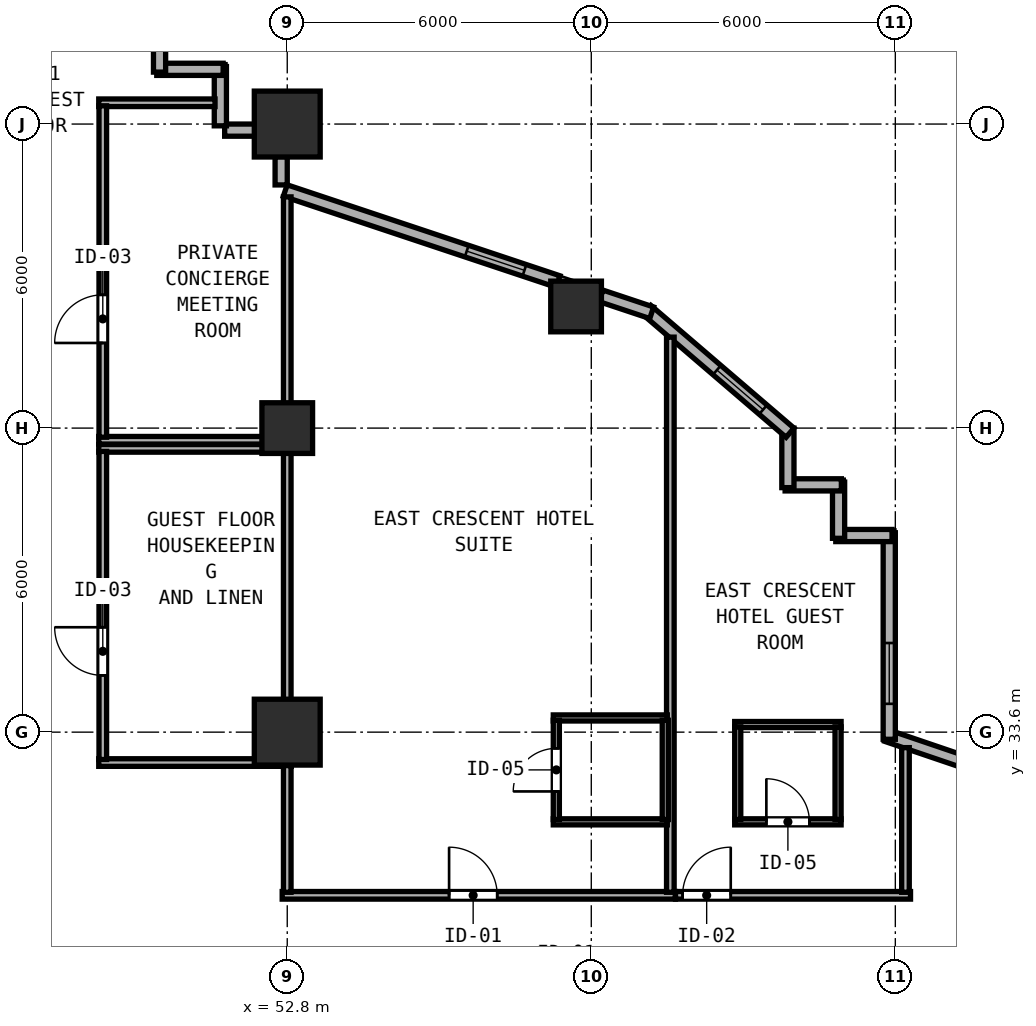
"""IFC4 building model, lengths in metres.
Left out: names, types, materials, properties, quantities, classifications, styles, units other than length and angle.
Written with IfcOpenShell. Run it as: python <this file> out.ifc"""

import sys

from ifc_helpers import new_model, si_unit, direction, frame, frame_2d, origin, origin_2d, place, context, subcontext, project, spatial, rectangle, hollow_rectangle, extrude, element, fill, save


model = new_model("IFC4")
c1 = context("Model", 3, precision=1e-05, world=origin(), true_north=direction((0.0, 1.0)))
c2 = subcontext(c1, "Body", "Model", "MODEL_VIEW")
j1 = project(units=[si_unit("LENGTHUNIT", "METRE"), si_unit("PLANEANGLEUNIT", "RADIAN")], contexts=[c1])
p1 = place(None, origin())
s1 = spatial("IfcSite", under=j1, at=p1, CompositionType="ELEMENT")
p2 = place(p1, origin())
s2 = spatial("IfcBuilding", under=s1, at=p2, CompositionType="ELEMENT")
p3 = place(p2, frame((0.0, 0.0, 35.4)))
s3 = spatial("IfcBuildingStorey", under=s2, at=p3, CompositionType="ELEMENT", Elevation=35.4)
for number, where, z_axis, x_axis in (
    (1, (52.8, 33.6, 0.0), (0.0, 0.0, 1.0), (1.0, 0.0, 0.0)),
    (2, (52.8, 45.6, 0.0), (0.0, 0.0, 1.0), (1.0, 0.0, 0.0)),
):
    element("IfcColumn", number, at=place(p3, frame(where, z_axis=z_axis, x_axis=x_axis)), inside=s3, PredefinedType="COLUMN", context=c2, shape_type="SweptSolid", body=[
        extrude(hollow_rectangle(XDim=1.3, YDim=1.3, WallThickness=0.048, at=origin_2d()), origin(), (0.0, 0.0, 1.0), 3.8),
    ])
for number, where, z_axis, x_axis in (
    (3, (52.8, 39.6, 0.0), (0.0, 0.0, 1.0), (1.0, 0.0, 0.0)),
    (4, (58.5, 42.0, 0.0), (0.0, 0.0, 1.0), (1.0, 0.0, 0.0)),
):
    element("IfcColumn", number, at=place(p3, frame(where, z_axis=z_axis, x_axis=x_axis)), inside=s3, PredefinedType="COLUMN", context=c2, shape_type="SweptSolid", body=[
        extrude(hollow_rectangle(XDim=1.0, YDim=1.0, WallThickness=0.038, at=origin_2d()), origin(), (0.0, 0.0, 1.0), 3.8),
    ])
p4 = place(p3, frame((71.844, 31.079, 0.0), z_axis=(0.0, 0.0, 1.0), x_axis=(-0.946792852546, 0.321843586805, 0.0)))
e5 = element("IfcWall", 5, at=p4, inside=s3, PredefinedType="SOLIDWALL", context=c2, shape_type="SweptSolid", body=[
    extrude(rectangle(XDim=7.622, YDim=0.24, at=frame_2d((3.811, 0.0))), origin(), (0.0, 0.0, 1.0), 3.6),
])
p5 = place(p4, frame((0.7, 0.0, 0.85)))
e6 = element("IfcOpeningElement", 6, at=p5, cuts=e5, PredefinedType="OPENING", context=c2, shape_type="SweptSolid", body=[
    extrude(rectangle(XDim=1.2, YDim=1.85, at=frame_2d((0.6, 0.925))), frame((0.0, 0.13, 0.0), z_axis=(0.0, -1.0, 0.0), x_axis=(1.0, 0.0, 0.0)), (0.0, 0.0, 1.0), 0.26),
])
p6 = place(p3, frame((64.68, 33.459, 0.0), z_axis=(0.0, 0.0, 1.0), x_axis=(0.0, 1.0, 0.0)))
e7 = element("IfcWall", 7, at=p6, inside=s3, PredefinedType="SOLIDWALL", context=c2, shape_type="SweptSolid", body=[
    extrude(rectangle(XDim=4.076, YDim=0.24, at=frame_2d((2.038, 0.0))), origin(), (0.0, 0.0, 1.0), 3.6),
])
p7 = place(p6, frame((0.7, 0.0, 0.85)))
e8 = element("IfcOpeningElement", 8, at=p7, cuts=e7, PredefinedType="OPENING", context=c2, shape_type="SweptSolid", body=[
    extrude(rectangle(XDim=1.2, YDim=1.85, at=frame_2d((0.6, 0.925))), frame((0.0, 0.13, 0.0), z_axis=(0.0, -1.0, 0.0), x_axis=(1.0, 0.0, 0.0)), (0.0, 0.0, 1.0), 0.26),
])
p8 = place(p3, frame((64.735, 37.48, 0.0), z_axis=(0.0, 0.0, 1.0), x_axis=(-1.0, 0.0, 0.0)))
e9 = element("IfcWall", 9, at=p8, inside=s3, PredefinedType="SOLIDWALL", context=c2, shape_type="SweptSolid", body=[
    extrude(rectangle(XDim=1.11, YDim=0.24, at=frame_2d((0.555, 0.0))), origin(), (0.0, 0.0, 1.0), 3.6),
])
p9 = place(p3, frame((63.68, 37.425, 0.0), z_axis=(0.0, 0.0, 1.0), x_axis=(0.0, 1.0, 0.0)))
e10 = element("IfcWall", 10, at=p9, inside=s3, PredefinedType="SOLIDWALL", context=c2, shape_type="SweptSolid", body=[
    extrude(rectangle(XDim=1.11, YDim=0.24, at=frame_2d((0.555, 0.0))), origin(), (0.0, 0.0, 1.0), 3.6),
])
p10 = place(p3, frame((63.735, 38.48, 0.0), z_axis=(0.0, 0.0, 1.0), x_axis=(-1.0, 0.0, 0.0)))
e11 = element("IfcWall", 11, at=p10, inside=s3, PredefinedType="SOLIDWALL", context=c2, shape_type="SweptSolid", body=[
    extrude(rectangle(XDim=1.11, YDim=0.24, at=frame_2d((0.555, 0.0))), origin(), (0.0, 0.0, 1.0), 3.6),
])
p11 = place(p3, frame((62.68, 38.425, 0.0), z_axis=(0.0, 0.0, 1.0), x_axis=(0.0, 1.0, 0.0)))
e12 = element("IfcWall", 12, at=p11, inside=s3, PredefinedType="SOLIDWALL", context=c2, shape_type="SweptSolid", body=[
    extrude(rectangle(XDim=1.175, YDim=0.24, at=frame_2d((0.587, 0.0))), origin(), (0.0, 0.0, 1.0), 3.6),
])
p12 = place(p3, frame((62.722, 39.509, 0.0), z_axis=(0.0, 0.0, 1.0), x_axis=(-0.759247334792, 0.650802185469, 0.0)))
e13 = element("IfcWall", 13, at=p12, inside=s3, PredefinedType="SOLIDWALL", context=c2, shape_type="SweptSolid", body=[
    extrude(rectangle(XDim=3.719, YDim=0.24, at=frame_2d((1.86, 0.0))), origin(), (0.0, 0.0, 1.0), 3.6),
])
p13 = place(p12, frame((0.7, 0.0, 0.85)))
e14 = element("IfcOpeningElement", 14, at=p13, cuts=e13, PredefinedType="OPENING", context=c2, shape_type="SweptSolid", body=[
    extrude(rectangle(XDim=1.2, YDim=1.85, at=frame_2d((0.6, 0.925))), frame((0.0, 0.13, 0.0), z_axis=(0.0, -1.0, 0.0), x_axis=(1.0, 0.0, 0.0)), (0.0, 0.0, 1.0), 0.26),
])
p14 = place(p3, frame((59.992, 41.876, 0.0), z_axis=(0.0, 0.0, 1.0), x_axis=(-0.948706457285, 0.316158279832, 0.0)))
e15 = element("IfcWall", 15, at=p14, inside=s3, PredefinedType="SOLIDWALL", context=c2, shape_type="SweptSolid", body=[
    extrude(rectangle(XDim=1.054, YDim=0.24, at=frame_2d((0.527, 0.0))), origin(), (0.0, 0.0, 1.0), 3.6),
])
p15 = place(p3, frame((58.145, 42.492, 0.0), z_axis=(0.0, 0.0, 1.0), x_axis=(-0.948683298051, 0.316227766017, 0.0)))
e16 = element("IfcWall", 16, at=p15, inside=s3, PredefinedType="SOLIDWALL", context=c2, shape_type="SweptSolid", body=[
    extrude(rectangle(XDim=5.675, YDim=0.24, at=frame_2d((2.838, 0.0))), origin(), (0.0, 0.0, 1.0), 3.097),
])
p16 = place(p15, frame((0.7, 0.0, 0.85)))
e17 = element("IfcOpeningElement", 17, at=p16, cuts=e16, PredefinedType="OPENING", context=c2, shape_type="SweptSolid", body=[
    extrude(rectangle(XDim=1.2, YDim=1.85, at=frame_2d((0.6, 0.925))), frame((0.0, 0.13, 0.0), z_axis=(0.0, -1.0, 0.0), x_axis=(1.0, 0.0, 0.0)), (0.0, 0.0, 1.0), 0.26),
])
p17 = place(p3, frame((52.68, 44.398, 0.0), z_axis=(0.0, 0.0, 1.0), x_axis=(0.0, 1.0, 0.0)))
e18 = element("IfcWall", 18, at=p17, inside=s3, PredefinedType="SOLIDWALL", context=c2, shape_type="SweptSolid", body=[
    extrude(rectangle(XDim=0.56, YDim=0.24, at=frame_2d((0.28, 0.0))), origin(), (0.0, 0.0, 1.0), 3.097),
])
p18 = place(p3, frame((52.158, 45.48, 0.0), z_axis=(0.0, 0.0, 1.0), x_axis=(-1.0, 0.0, 0.0)))
e19 = element("IfcWall", 19, at=p18, inside=s3, PredefinedType="SOLIDWALL", context=c2, shape_type="SweptSolid", body=[
    extrude(rectangle(XDim=0.593, YDim=0.24, at=frame_2d((0.296, 0.0))), origin(), (0.0, 0.0, 1.0), 3.6),
])
p19 = place(p3, frame((51.48, 45.565, 0.0), z_axis=(0.0, 0.0, 1.0), x_axis=(0.0, 1.0, 0.0)))
e20 = element("IfcWall", 20, at=p19, inside=s3, PredefinedType="SOLIDWALL", context=c2, shape_type="SweptSolid", body=[
    extrude(rectangle(XDim=1.17, YDim=0.24, at=frame_2d((0.585, 0.0))), origin(), (0.0, 0.0, 1.0), 3.6),
])
p20 = place(p3, frame((51.535, 46.68, 0.0), z_axis=(0.0, 0.0, 1.0), x_axis=(-1.0, 0.0, 0.0)))
e21 = element("IfcWall", 21, at=p20, inside=s3, PredefinedType="SOLIDWALL", context=c2, shape_type="SweptSolid", body=[
    extrude(rectangle(XDim=1.31, YDim=0.24, at=frame_2d((0.655, 0.0))), origin(), (0.0, 0.0, 1.0), 3.6),
])
p21 = place(p3, frame((50.28, 46.625, 0.0), z_axis=(0.0, 0.0, 1.0), x_axis=(0.0, 1.0, 0.0)))
e22 = element("IfcWall", 22, at=p21, inside=s3, PredefinedType="SOLIDWALL", context=c2, shape_type="SweptSolid", body=[
    extrude(rectangle(XDim=1.37, YDim=0.24, at=frame_2d((0.685, 0.0))), origin(), (0.0, 0.0, 1.0), 3.6),
])
for number, where, z_axis, x_axis in (
    (23, (49.08, 39.2, 0.0), (0.0, 0.0, 1.0), (1.0, 0.0, 0.0)),
    (24, (49.08, 33.0, 0.0), (0.0, 0.0, 1.0), (1.0, 0.0, 0.0)),
):
    element("IfcWall", number, at=place(p3, frame(where, z_axis=z_axis, x_axis=x_axis)), inside=s3, PredefinedType="PARTITIONING", context=c2, shape_type="SweptSolid", body=[
        extrude(rectangle(XDim=3.8, YDim=0.15, at=frame_2d((1.9, 0.0))), origin(), (0.0, 0.0, 1.0), 3.6),
    ])
p22 = place(p3, frame((49.16, 33.06, 0.0), z_axis=(0.0, 0.0, 1.0), x_axis=(0.0, 1.0, 0.0)))
e25 = element("IfcWall", 25, at=p22, inside=s3, PredefinedType="PARTITIONING", context=c2, shape_type="SweptSolid", body=[
    extrude(rectangle(XDim=6.08, YDim=0.15, at=frame_2d((3.04, 0.0))), origin(), (0.0, 0.0, 1.0), 3.6),
])
p23 = place(p22, frame((1.66, 0.0, 0.0)))
e26 = element("IfcOpeningElement", 26, at=p23, cuts=e25, PredefinedType="OPENING", context=c2, shape_type="SweptSolid", body=[
    extrude(rectangle(XDim=0.95, YDim=2.12, at=frame_2d((0.475, 1.06))), frame((0.0, 0.085, 0.0), z_axis=(0.0, -1.0, 0.0), x_axis=(1.0, 0.0, 0.0)), (0.0, 0.0, 1.0), 0.17),
])
p24 = place(p3, frame((52.8, 33.06, 0.0), z_axis=(0.0, 0.0, 1.0), x_axis=(0.0, 1.0, 0.0)))
e27 = element("IfcWall", 27, at=p24, inside=s3, PredefinedType="PARTITIONING", context=c2, shape_type="SweptSolid", body=[
    extrude(rectangle(XDim=6.08, YDim=0.15, at=frame_2d((3.04, 0.0))), origin(), (0.0, 0.0, 1.0), 3.097),
])
p25 = place(p3, frame((49.08, 46.02, 0.0), z_axis=(0.0, 0.0, 1.0), x_axis=(1.0, 0.0, 0.0)))
e28 = element("IfcWall", 28, at=p25, inside=s3, PredefinedType="PARTITIONING", context=c2, shape_type="SweptSolid", body=[
    extrude(rectangle(XDim=2.295, YDim=0.15, at=frame_2d((1.147, 0.0))), origin(), (0.0, 0.0, 1.0), 3.6),
])
p26 = place(p3, frame((49.08, 39.36, 0.0), z_axis=(0.0, 0.0, 1.0), x_axis=(1.0, 0.0, 0.0)))
e29 = element("IfcWall", 29, at=p26, inside=s3, PredefinedType="PARTITIONING", context=c2, shape_type="SweptSolid", body=[
    extrude(rectangle(XDim=3.8, YDim=0.15, at=frame_2d((1.9, 0.0))), origin(), (0.0, 0.0, 1.0), 3.6),
])
p27 = place(p3, frame((49.16, 39.42, 0.0), z_axis=(0.0, 0.0, 1.0), x_axis=(0.0, 1.0, 0.0)))
e30 = element("IfcWall", 30, at=p27, inside=s3, PredefinedType="PARTITIONING", context=c2, shape_type="SweptSolid", body=[
    extrude(rectangle(XDim=6.54, YDim=0.15, at=frame_2d((3.27, 0.0))), origin(), (0.0, 0.0, 1.0), 3.6),
])
p28 = place(p27, frame((1.86, 0.0, 0.0)))
e31 = element("IfcOpeningElement", 31, at=p28, cuts=e30, PredefinedType="OPENING", context=c2, shape_type="SweptSolid", body=[
    extrude(rectangle(XDim=0.95, YDim=2.12, at=frame_2d((0.475, 1.06))), frame((0.0, 0.085, 0.0), z_axis=(0.0, -1.0, 0.0), x_axis=(1.0, 0.0, 0.0)), (0.0, 0.0, 1.0), 0.17),
])
p29 = place(p3, frame((52.8, 39.42, 0.0), z_axis=(0.0, 0.0, 1.0), x_axis=(0.0, 1.0, 0.0)))
e32 = element("IfcWall", 32, at=p29, inside=s3, PredefinedType="PARTITIONING", context=c2, shape_type="SweptSolid", body=[
    extrude(rectangle(XDim=4.743, YDim=0.15, at=frame_2d((2.372, 0.0))), origin(), (0.0, 0.0, 1.0), 3.097),
])
p30 = place(p3, frame((52.7, 30.38, 0.0), z_axis=(0.0, 0.0, 1.0), x_axis=(1.0, 0.0, 0.0)))
e33 = element("IfcWall", 33, at=p30, inside=s3, PredefinedType="PARTITIONING", context=c2, shape_type="SweptSolid", body=[
    extrude(rectangle(XDim=7.76, YDim=0.15, at=frame_2d((3.88, 0.0))), origin(), (0.0, 0.0, 1.0), 3.6),
])
p31 = place(p30, frame((3.294, 0.0, 0.0)))
e34 = element("IfcOpeningElement", 34, at=p31, cuts=e33, PredefinedType="OPENING", context=c2, shape_type="SweptSolid", body=[
    extrude(rectangle(XDim=0.95, YDim=2.18, at=frame_2d((0.475, 1.09))), frame((0.0, 0.085, 0.0), z_axis=(0.0, -1.0, 0.0), x_axis=(1.0, 0.0, 0.0)), (0.0, 0.0, 1.0), 0.17),
])
p32 = place(p3, frame((52.8, 30.44, 0.0), z_axis=(0.0, 0.0, 1.0), x_axis=(0.0, 1.0, 0.0)))
e35 = element("IfcWall", 35, at=p32, inside=s3, PredefinedType="PARTITIONING", context=c2, shape_type="SweptSolid", body=[
    extrude(rectangle(XDim=2.5, YDim=0.15, at=frame_2d((1.25, 0.0))), origin(), (0.0, 0.0, 1.0), 3.097),
])
p33 = place(p3, frame((60.36, 30.44, 0.0), z_axis=(0.0, 0.0, 1.0), x_axis=(0.0, 1.0, 0.0)))
e36 = element("IfcWall", 36, at=p33, inside=s3, PredefinedType="PARTITIONING", context=c2, shape_type="SweptSolid", body=[
    extrude(rectangle(XDim=10.955, YDim=0.15, at=frame_2d((5.478, 0.0))), origin(), (0.0, 0.0, 1.0), 3.6),
])
for number, where, z_axis, x_axis in (
    (37, (58.05, 33.88, 0.0), (0.0, 0.0, 1.0), (1.0, 0.0, 0.0)),
    (38, (58.05, 31.83, 0.0), (0.0, 0.0, 1.0), (1.0, 0.0, 0.0)),
):
    element("IfcWall", number, at=place(p3, frame(where, z_axis=z_axis, x_axis=x_axis)), inside=s3, PredefinedType="PARTITIONING", context=c2, shape_type="SweptSolid", body=[
        extrude(rectangle(XDim=2.25, YDim=0.12, at=frame_2d((1.125, 0.0))), origin(), (0.0, 0.0, 1.0), 3.6),
    ])
p34 = place(p3, frame((58.11, 31.875, 0.0), z_axis=(0.0, 0.0, 1.0), x_axis=(0.0, 1.0, 0.0)))
e39 = element("IfcWall", 39, at=p34, inside=s3, PredefinedType="PARTITIONING", context=c2, shape_type="SweptSolid", body=[
    extrude(rectangle(XDim=1.96, YDim=0.12, at=frame_2d((0.98, 0.0))), origin(), (0.0, 0.0, 1.0), 3.6),
])
p35 = place(p34, frame((1.405, 0.0, 0.0), z_axis=(0.0, 0.0, 1.0), x_axis=(-1.0, 0.0, 0.0)))
e40 = element("IfcOpeningElement", 40, at=p35, cuts=e39, PredefinedType="OPENING", context=c2, shape_type="SweptSolid", body=[
    extrude(rectangle(XDim=0.85, YDim=2.1, at=frame_2d((0.425, 1.05))), frame((0.0, 0.07, 0.0), z_axis=(0.0, -1.0, 0.0), x_axis=(1.0, 0.0, 0.0)), (0.0, 0.0, 1.0), 0.14),
])
p36 = place(p3, frame((60.26, 31.875, 0.0), z_axis=(0.0, 0.0, 1.0), x_axis=(0.0, 1.0, 0.0)))
e41 = element("IfcWall", 41, at=p36, inside=s3, PredefinedType="PARTITIONING", context=c2, shape_type="SweptSolid", body=[
    extrude(rectangle(XDim=1.96, YDim=0.12, at=frame_2d((0.98, 0.0))), origin(), (0.0, 0.0, 1.0), 3.6),
])
p37 = place(p3, frame((60.462, 30.38, 0.0), z_axis=(0.0, 0.0, 1.0), x_axis=(1.0, 0.0, 0.0)))
e42 = element("IfcWall", 42, at=p37, inside=s3, PredefinedType="PARTITIONING", context=c2, shape_type="SweptSolid", body=[
    extrude(rectangle(XDim=4.638, YDim=0.15, at=frame_2d((2.319, 0.0))), origin(), (0.0, 0.0, 1.0), 3.6),
])
p38 = place(p37, frame((0.14, 0.0, 0.0)))
e43 = element("IfcOpeningElement", 43, at=p38, cuts=e42, PredefinedType="OPENING", context=c2, shape_type="SweptSolid", body=[
    extrude(rectangle(XDim=0.95, YDim=2.15, at=frame_2d((0.475, 1.075))), frame((0.0, 0.085, 0.0), z_axis=(0.0, -1.0, 0.0), x_axis=(1.0, 0.0, 0.0)), (0.0, 0.0, 1.0), 0.17),
])
p39 = place(p3, frame((65.0, 30.44, 0.0), z_axis=(0.0, 0.0, 1.0), x_axis=(0.0, 1.0, 0.0)))
e44 = element("IfcWall", 44, at=p39, inside=s3, PredefinedType="PARTITIONING", context=c2, shape_type="SweptSolid", body=[
    extrude(rectangle(XDim=2.854, YDim=0.15, at=frame_2d((1.427, 0.0))), origin(), (0.0, 0.0, 1.0), 3.6),
])
p40 = place(p3, frame((61.63, 33.75, 0.0), z_axis=(0.0, 0.0, 1.0), x_axis=(1.0, 0.0, 0.0)))
e45 = element("IfcWall", 45, at=p40, inside=s3, PredefinedType="PARTITIONING", context=c2, shape_type="SweptSolid", body=[
    extrude(rectangle(XDim=2.1, YDim=0.12, at=frame_2d((1.05, 0.0))), origin(), (0.0, 0.0, 1.0), 3.6),
])
p41 = place(p3, frame((61.63, 31.83, 0.0), z_axis=(0.0, 0.0, 1.0), x_axis=(1.0, 0.0, 0.0)))
e46 = element("IfcWall", 46, at=p41, inside=s3, PredefinedType="PARTITIONING", context=c2, shape_type="SweptSolid", body=[
    extrude(rectangle(XDim=2.1, YDim=0.12, at=frame_2d((1.05, 0.0))), origin(), (0.0, 0.0, 1.0), 3.6),
])
p42 = place(p41, frame((0.625, 0.0, 0.0)))
e47 = element("IfcOpeningElement", 47, at=p42, cuts=e46, PredefinedType="OPENING", context=c2, shape_type="SweptSolid", body=[
    extrude(rectangle(XDim=0.85, YDim=2.1, at=frame_2d((0.425, 1.05))), frame((0.0, 0.07, 0.0), z_axis=(0.0, -1.0, 0.0), x_axis=(1.0, 0.0, 0.0)), (0.0, 0.0, 1.0), 0.14),
])
for number, where, z_axis, x_axis in (
    (48, (61.69, 31.875, 0.0), (0.0, 0.0, 1.0), (0.0, 1.0, 0.0)),
    (49, (63.67, 31.875, 0.0), (0.0, 0.0, 1.0), (0.0, 1.0, 0.0)),
):
    element("IfcWall", number, at=place(p3, frame(where, z_axis=z_axis, x_axis=x_axis)), inside=s3, PredefinedType="PARTITIONING", context=c2, shape_type="SweptSolid", body=[
        extrude(rectangle(XDim=1.83, YDim=0.12, at=frame_2d((0.915, 0.0))), origin(), (0.0, 0.0, 1.0), 3.6),
    ])
p43 = place(p7, origin())
e50 = element("IfcWindow", 50, at=p43, inside=s3, PartitioningType="SINGLE_PANEL", PredefinedType="WINDOW", context=c2, shape_type="SweptSolid", body=[
    extrude(rectangle(XDim=1.2, YDim=1.85, at=frame_2d((0.6, 0.925))), frame((0.0, 0.03, 0.0), z_axis=(0.0, -1.0, 0.0), x_axis=(1.0, 0.0, 0.0)), (0.0, 0.0, 1.0), 0.06),
])
fill(e8, e50)
p44 = place(p13, origin())
e51 = element("IfcWindow", 51, at=p44, inside=s3, PartitioningType="SINGLE_PANEL", PredefinedType="WINDOW", context=c2, shape_type="SweptSolid", body=[
    extrude(rectangle(XDim=1.2, YDim=1.85, at=frame_2d((0.6, 0.925))), frame((0.0, 0.03, 0.0), z_axis=(0.0, -1.0, 0.0), x_axis=(1.0, 0.0, 0.0)), (0.0, 0.0, 1.0), 0.06),
])
fill(e14, e51)
p45 = place(p16, origin())
e52 = element("IfcWindow", 52, at=p45, inside=s3, PartitioningType="SINGLE_PANEL", PredefinedType="WINDOW", context=c2, shape_type="SweptSolid", body=[
    extrude(rectangle(XDim=1.2, YDim=1.85, at=frame_2d((0.6, 0.925))), frame((0.0, 0.03, 0.0), z_axis=(0.0, -1.0, 0.0), x_axis=(1.0, 0.0, 0.0)), (0.0, 0.0, 1.0), 0.06),
])
fill(e17, e52)
p46 = place(p23, origin())
e53 = element("IfcDoor", 53, at=p46, inside=s3, OperationType="SINGLE_SWING_RIGHT", PredefinedType="DOOR", context=c2, shape_type="SweptSolid", body=[
    extrude(rectangle(XDim=0.95, YDim=2.12, at=frame_2d((0.475, 1.06))), frame((0.0, 0.025, 0.0), z_axis=(0.0, -1.0, 0.0), x_axis=(1.0, 0.0, 0.0)), (0.0, 0.0, 1.0), 0.05),
])
fill(e26, e53)
p47 = place(p28, origin())
e54 = element("IfcDoor", 54, at=p47, inside=s3, OperationType="SINGLE_SWING_LEFT", PredefinedType="DOOR", context=c2, shape_type="SweptSolid", body=[
    extrude(rectangle(XDim=0.95, YDim=2.12, at=frame_2d((0.475, 1.06))), frame((0.0, 0.025, 0.0), z_axis=(0.0, -1.0, 0.0), x_axis=(1.0, 0.0, 0.0)), (0.0, 0.0, 1.0), 0.05),
])
fill(e31, e54)
p48 = place(p31, origin())
e55 = element("IfcDoor", 55, at=p48, inside=s3, OperationType="SINGLE_SWING_LEFT", PredefinedType="DOOR", context=c2, shape_type="SweptSolid", body=[
    extrude(rectangle(XDim=0.95, YDim=2.18, at=frame_2d((0.475, 1.09))), frame((0.0, 0.025, 0.0), z_axis=(0.0, -1.0, 0.0), x_axis=(1.0, 0.0, 0.0)), (0.0, 0.0, 1.0), 0.05),
])
fill(e34, e55)
p49 = place(p35, origin())
e56 = element("IfcDoor", 56, at=p49, inside=s3, OperationType="SINGLE_SWING_RIGHT", PredefinedType="DOOR", context=c2, shape_type="SweptSolid", body=[
    extrude(rectangle(XDim=0.85, YDim=2.1, at=frame_2d((0.425, 1.05))), frame((0.0, 0.025, 0.0), z_axis=(0.0, -1.0, 0.0), x_axis=(1.0, 0.0, 0.0)), (0.0, 0.0, 1.0), 0.05),
])
fill(e40, e56)
p50 = place(p38, origin())
e57 = element("IfcDoor", 57, at=p50, inside=s3, OperationType="SINGLE_SWING_RIGHT", PredefinedType="DOOR", context=c2, shape_type="SweptSolid", body=[
    extrude(rectangle(XDim=0.95, YDim=2.15, at=frame_2d((0.475, 1.075))), frame((0.0, 0.025, 0.0), z_axis=(0.0, -1.0, 0.0), x_axis=(1.0, 0.0, 0.0)), (0.0, 0.0, 1.0), 0.05),
])
fill(e43, e57)
p51 = place(p42, origin())
e58 = element("IfcDoor", 58, at=p51, inside=s3, OperationType="SINGLE_SWING_LEFT", PredefinedType="DOOR", context=c2, shape_type="SweptSolid", body=[
    extrude(rectangle(XDim=0.85, YDim=2.1, at=frame_2d((0.425, 1.05))), frame((0.0, 0.025, 0.0), z_axis=(0.0, -1.0, 0.0), x_axis=(1.0, 0.0, 0.0)), (0.0, 0.0, 1.0), 0.05),
])
fill(e47, e58)
save(model, sys.argv[1])
